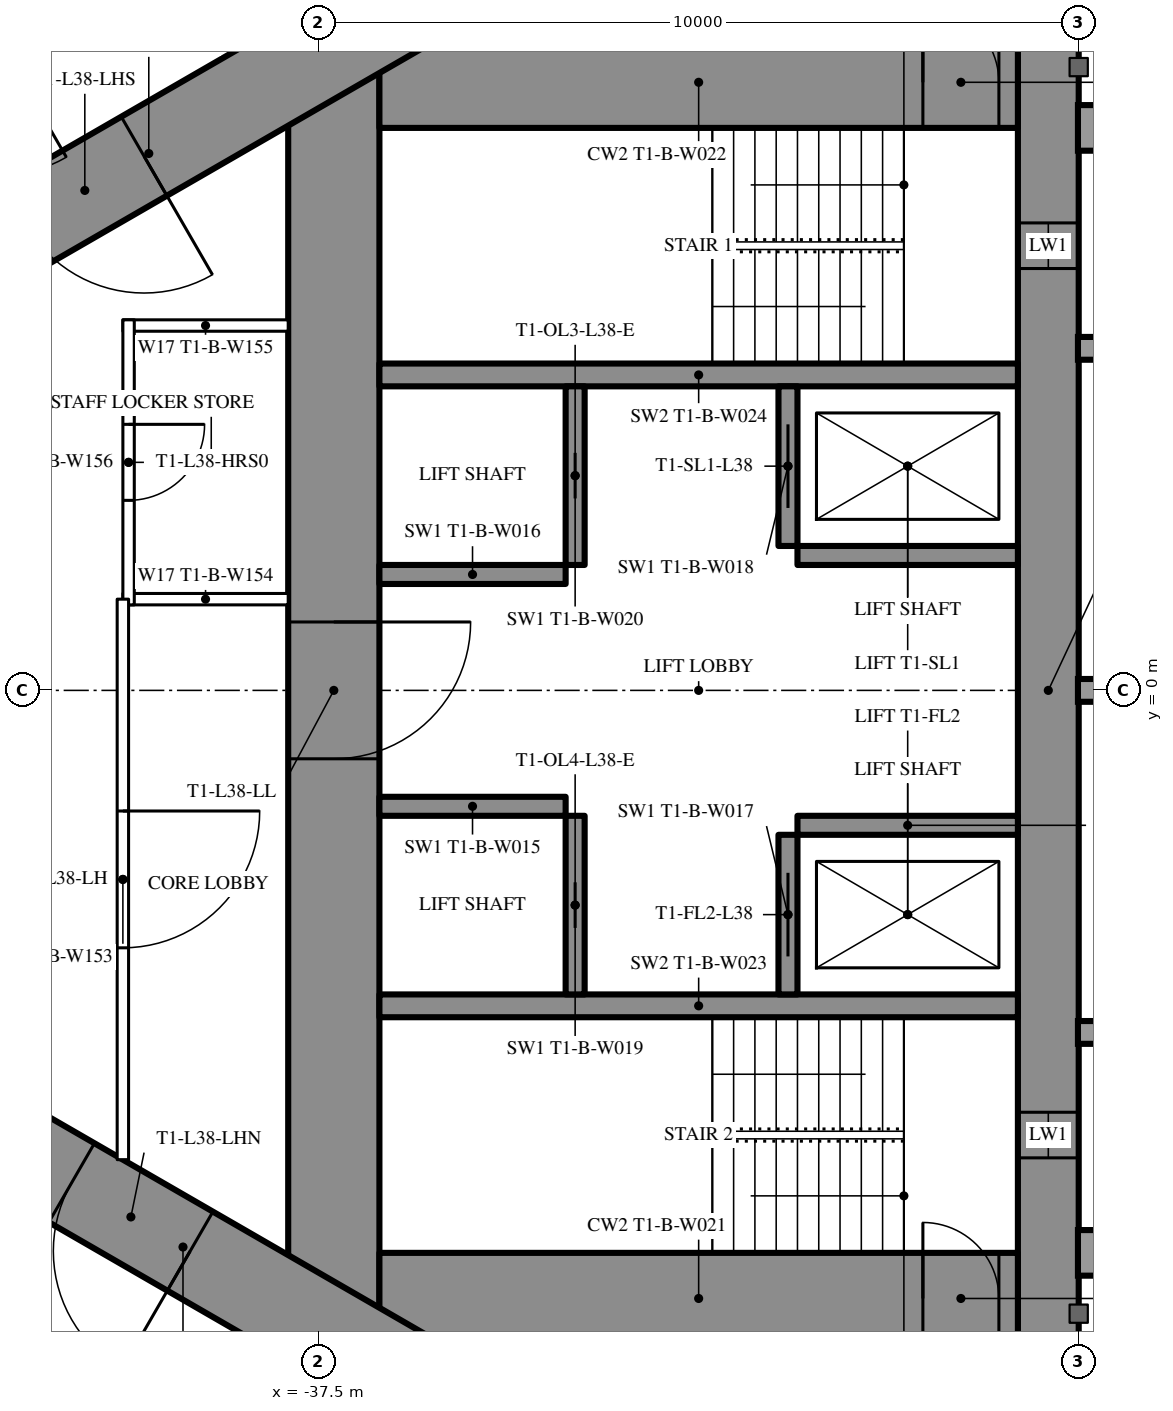
"""IFC4 building model, lengths in metres.
Left out: names, types, materials, properties, quantities, classifications, styles, units other than length and angle.
Written with IfcOpenShell. Run it as: python <this file> out.ifc"""

import sys

from ifc_helpers import new_model, si_unit, direction, frame, frame_2d, origin, place, context, subcontext, project, spatial, rectangle, extrude, element, fill, save


model = new_model("IFC4")
c1 = context("Model", 3, precision=1e-05, world=origin(), true_north=direction((0.0, 1.0)))
c2 = subcontext(c1, "Body", "Model", "MODEL_VIEW")
j1 = project(units=[si_unit("LENGTHUNIT", "METRE"), si_unit("PLANEANGLEUNIT", "RADIAN")], contexts=[c1])
p1 = place(None, origin())
s1 = spatial("IfcSite", under=j1, at=p1, CompositionType="ELEMENT")
p2 = place(p1, origin())
s2 = spatial("IfcBuilding", under=s1, at=p2, CompositionType="ELEMENT")
p3 = place(p2, frame((0.0, 0.0, 143.1)))
s3 = spatial("IfcBuildingStorey", under=s2, at=p3, CompositionType="ELEMENT", Elevation=143.1)
p4 = place(p3, frame((-27.9, 8.6, 0.0), z_axis=(0.0, 0.0, 1.0), x_axis=(0.0, -1.0, 0.0)))
e1 = element("IfcWall", 1, at=p4, inside=s3, PredefinedType="SHEAR", context=c2, shape_type="SweptSolid", body=[
    extrude(rectangle(XDim=17.2, YDim=0.8, at=frame_2d((8.6, 0.0))), origin(), (0.0, 0.0, 1.0), 3.6),
])
p5 = place(p4, frame((2.45, 0.0, 0.6)))
e2 = element("IfcOpeningElement", 2, at=p5, cuts=e1, PredefinedType="OPENING", context=c2, shape_type="SweptSolid", body=[
    extrude(rectangle(XDim=0.6, YDim=2.1, at=frame_2d((0.3, 1.05))), frame((0.0, 0.41, 0.0), z_axis=(0.0, -1.0, 0.0), x_axis=(1.0, 0.0, 0.0)), (0.0, 0.0, 1.0), 0.82),
])
p6 = place(p4, frame((14.15, 0.0, 0.6)))
e3 = element("IfcOpeningElement", 3, at=p6, cuts=e1, PredefinedType="OPENING", context=c2, shape_type="SweptSolid", body=[
    extrude(rectangle(XDim=0.6, YDim=2.1, at=frame_2d((0.3, 1.05))), frame((0.0, 0.41, 0.0), z_axis=(0.0, -1.0, 0.0), x_axis=(1.0, 0.0, 0.0)), (0.0, 0.0, 1.0), 0.82),
])
p7 = place(p3, frame((-37.3, 8.6, 0.0), z_axis=(0.0, 0.0, 1.0), x_axis=(0.0, -1.0, 0.0)))
e4 = element("IfcWall", 4, at=p7, inside=s3, PredefinedType="SHEAR", context=c2, shape_type="SweptSolid", body=[
    extrude(rectangle(XDim=17.2, YDim=1.2, at=frame_2d((8.6, 0.0))), origin(), (0.0, 0.0, 1.0), 3.6),
])
p8 = place(p7, frame((7.7, 0.0, 0.0)))
e5 = element("IfcOpeningElement", 5, at=p8, cuts=e4, PredefinedType="OPENING", context=c2, shape_type="SweptSolid", body=[
    extrude(rectangle(XDim=1.8, YDim=2.2, at=frame_2d((0.9, 1.1))), frame((0.0, 0.61, 0.0), z_axis=(0.0, -1.0, 0.0), x_axis=(1.0, 0.0, 0.0)), (0.0, 0.0, 1.0), 1.22),
])
p9 = place(p3, frame((-28.3, 8.0, 0.0), z_axis=(0.0, 0.0, 1.0), x_axis=(-1.0, 0.0, 0.0)))
e6 = element("IfcWall", 6, at=p9, inside=s3, PredefinedType="SHEAR", context=c2, shape_type="SweptSolid", body=[
    extrude(rectangle(XDim=8.4, YDim=1.2, at=frame_2d((4.2, 0.0))), origin(), (0.0, 0.0, 1.0), 3.6),
])
p10 = place(p9, frame((0.25, 0.0, 0.0)))
e7 = element("IfcOpeningElement", 7, at=p10, cuts=e6, PredefinedType="OPENING", context=c2, shape_type="SweptSolid", body=[
    extrude(rectangle(XDim=1.0, YDim=2.2, at=frame_2d((0.5, 1.1))), frame((0.0, 0.61, 0.0), z_axis=(0.0, -1.0, 0.0), x_axis=(1.0, 0.0, 0.0)), (0.0, 0.0, 1.0), 1.22),
])
p11 = place(p3, frame((-28.3, -8.0, 0.0), z_axis=(0.0, 0.0, 1.0), x_axis=(-1.0, 0.0, 0.0)))
e8 = element("IfcWall", 8, at=p11, inside=s3, PredefinedType="SHEAR", context=c2, shape_type="SweptSolid", body=[
    extrude(rectangle(XDim=8.4, YDim=1.2, at=frame_2d((4.2, 0.0))), origin(), (0.0, 0.0, 1.0), 3.6),
])
p12 = place(p11, frame((0.25, 0.0, 0.0)))
e9 = element("IfcOpeningElement", 9, at=p12, cuts=e8, PredefinedType="OPENING", context=c2, shape_type="SweptSolid", body=[
    extrude(rectangle(XDim=1.0, YDim=2.2, at=frame_2d((0.5, 1.1))), frame((0.0, 0.61, 0.0), z_axis=(0.0, -1.0, 0.0), x_axis=(1.0, 0.0, 0.0)), (0.0, 0.0, 1.0), 1.22),
])
for number, where, z_axis, x_axis in (
    (10, (-28.3, 4.15, 0.0), (0.0, 0.0, 1.0), (-1.0, 0.0, 0.0)),
    (11, (-28.3, -4.15, 0.0), (0.0, 0.0, 1.0), (-1.0, 0.0, 0.0)),
):
    element("IfcWall", number, at=place(p3, frame(where, z_axis=z_axis, x_axis=x_axis)), inside=s3, PredefinedType="SHEAR", context=c2, shape_type="SweptSolid", body=[
        extrude(rectangle(XDim=8.4, YDim=0.3, at=frame_2d((4.2, 0.0))), origin(), (0.0, 0.0, 1.0), 3.6),
    ])
p13 = place(p3, frame((-31.325, 4.0, 0.0), z_axis=(0.0, 0.0, 1.0), x_axis=(0.0, -1.0, 0.0)))
e12 = element("IfcWall", 12, at=p13, inside=s3, PredefinedType="SHEAR", context=c2, shape_type="SweptSolid", body=[
    extrude(rectangle(XDim=2.1, YDim=0.25, at=frame_2d((1.05, 0.0))), origin(), (0.0, 0.0, 1.0), 3.6),
])
p14 = place(p13, frame((0.5, 0.0, 0.0)))
e13 = element("IfcOpeningElement", 13, at=p14, cuts=e12, PredefinedType="OPENING", context=c2, shape_type="SweptSolid", body=[
    extrude(rectangle(XDim=1.1, YDim=2.2, at=frame_2d((0.55, 1.1))), frame((0.0, 0.135, 0.0), z_axis=(0.0, -1.0, 0.0), x_axis=(1.0, 0.0, 0.0)), (0.0, 0.0, 1.0), 0.27),
])
p15 = place(p3, frame((-34.125, 4.0, 0.0), z_axis=(0.0, 0.0, 1.0), x_axis=(0.0, -1.0, 0.0)))
e14 = element("IfcWall", 14, at=p15, inside=s3, PredefinedType="SHEAR", context=c2, shape_type="SweptSolid", body=[
    extrude(rectangle(XDim=2.35, YDim=0.25, at=frame_2d((1.175, 0.0))), origin(), (0.0, 0.0, 1.0), 3.6),
])
p16 = place(p15, frame((0.875, 0.0, 0.0)))
e15 = element("IfcOpeningElement", 15, at=p16, cuts=e14, PredefinedType="OPENING", context=c2, shape_type="SweptSolid", body=[
    extrude(rectangle(XDim=0.6, YDim=2.0, at=frame_2d((0.3, 1.0))), frame((0.0, 0.135, 0.0), z_axis=(0.0, -1.0, 0.0), x_axis=(1.0, 0.0, 0.0)), (0.0, 0.0, 1.0), 0.27),
])
p17 = place(p3, frame((-28.3, 1.775, 0.0), z_axis=(0.0, 0.0, 1.0), x_axis=(-1.0, 0.0, 0.0)))
e16 = element("IfcWall", 16, at=p17, inside=s3, PredefinedType="SHEAR", context=c2, shape_type="SweptSolid", body=[
    extrude(rectangle(XDim=2.9, YDim=0.25, at=frame_2d((1.45, 0.0))), origin(), (0.0, 0.0, 1.0), 3.6),
])
p18 = place(p3, frame((-34.25, 1.525, 0.0), z_axis=(0.0, 0.0, 1.0), x_axis=(-1.0, 0.0, 0.0)))
e17 = element("IfcWall", 17, at=p18, inside=s3, PredefinedType="SHEAR", context=c2, shape_type="SweptSolid", body=[
    extrude(rectangle(XDim=2.45, YDim=0.25, at=frame_2d((1.225, 0.0))), origin(), (0.0, 0.0, 1.0), 3.6),
])
p19 = place(p3, frame((-31.325, -1.9, 0.0), z_axis=(0.0, 0.0, 1.0), x_axis=(0.0, -1.0, 0.0)))
e18 = element("IfcWall", 18, at=p19, inside=s3, PredefinedType="SHEAR", context=c2, shape_type="SweptSolid", body=[
    extrude(rectangle(XDim=2.1, YDim=0.25, at=frame_2d((1.05, 0.0))), origin(), (0.0, 0.0, 1.0), 3.6),
])
p20 = place(p19, frame((0.5, 0.0, 0.0)))
e19 = element("IfcOpeningElement", 19, at=p20, cuts=e18, PredefinedType="OPENING", context=c2, shape_type="SweptSolid", body=[
    extrude(rectangle(XDim=1.1, YDim=2.2, at=frame_2d((0.55, 1.1))), frame((0.0, 0.135, 0.0), z_axis=(0.0, -1.0, 0.0), x_axis=(1.0, 0.0, 0.0)), (0.0, 0.0, 1.0), 0.27),
])
p21 = place(p3, frame((-34.125, -1.65, 0.0), z_axis=(0.0, 0.0, 1.0), x_axis=(0.0, -1.0, 0.0)))
e20 = element("IfcWall", 20, at=p21, inside=s3, PredefinedType="SHEAR", context=c2, shape_type="SweptSolid", body=[
    extrude(rectangle(XDim=2.35, YDim=0.25, at=frame_2d((1.175, 0.0))), origin(), (0.0, 0.0, 1.0), 3.6),
])
p22 = place(p21, frame((0.875, 0.0, 0.0)))
e21 = element("IfcOpeningElement", 21, at=p22, cuts=e20, PredefinedType="OPENING", context=c2, shape_type="SweptSolid", body=[
    extrude(rectangle(XDim=0.6, YDim=2.0, at=frame_2d((0.3, 1.0))), frame((0.0, 0.135, 0.0), z_axis=(0.0, -1.0, 0.0), x_axis=(1.0, 0.0, 0.0)), (0.0, 0.0, 1.0), 0.27),
])
p23 = place(p3, frame((-28.3, -1.775, 0.0), z_axis=(0.0, 0.0, 1.0), x_axis=(-1.0, 0.0, 0.0)))
e22 = element("IfcWall", 22, at=p23, inside=s3, PredefinedType="SHEAR", context=c2, shape_type="SweptSolid", body=[
    extrude(rectangle(XDim=2.9, YDim=0.25, at=frame_2d((1.45, 0.0))), origin(), (0.0, 0.0, 1.0), 3.6),
])
p24 = place(p3, frame((-34.25, -1.525, 0.0), z_axis=(0.0, 0.0, 1.0), x_axis=(-1.0, 0.0, 0.0)))
e23 = element("IfcWall", 23, at=p24, inside=s3, PredefinedType="SHEAR", context=c2, shape_type="SweptSolid", body=[
    extrude(rectangle(XDim=2.45, YDim=0.25, at=frame_2d((1.225, 0.0))), origin(), (0.0, 0.0, 1.0), 3.6),
])
p25 = place(p3, frame((-27.2, 14.3, 0.0), z_axis=(0.0, 0.0, 1.0), x_axis=(-0.866026593062, -0.499997940104, 0.0)))
e24 = element("IfcWall", 24, at=p25, inside=s3, PredefinedType="SHEAR", context=c2, shape_type="SweptSolid", body=[
    extrude(rectangle(XDim=28.946, YDim=1.2, at=frame_2d((14.473, 0.0))), origin(), (0.0, 0.0, 1.0), 3.6),
])
p26 = place(p25, frame((4.6, 0.0, 0.0)))
e25 = element("IfcOpeningElement", 25, at=p26, cuts=e24, PredefinedType="OPENING", context=c2, shape_type="SweptSolid", body=[
    extrude(rectangle(XDim=1.0, YDim=2.2, at=frame_2d((0.5, 1.1))), frame((0.0, 0.61, 0.0), z_axis=(0.0, -1.0, 0.0), x_axis=(1.0, 0.0, 0.0)), (0.0, 0.0, 1.0), 1.22),
])
p27 = place(p25, frame((14.545, 0.0, 0.0)))
e26 = element("IfcOpeningElement", 26, at=p27, cuts=e24, PredefinedType="OPENING", context=c2, shape_type="SweptSolid", body=[
    extrude(rectangle(XDim=1.8, YDim=2.2, at=frame_2d((0.9, 1.1))), frame((0.0, 0.61, 0.0), z_axis=(0.0, -1.0, 0.0), x_axis=(1.0, 0.0, 0.0)), (0.0, 0.0, 1.0), 1.22),
])
p28 = place(p3, frame((-27.2, -14.3, 0.0), z_axis=(0.0, 0.0, 1.0), x_axis=(-0.866024021859, 0.500002393557, 0.0)))
e27 = element("IfcWall", 27, at=p28, inside=s3, PredefinedType="SHEAR", context=c2, shape_type="SweptSolid", body=[
    extrude(rectangle(XDim=27.907, YDim=1.2, at=frame_2d((13.954, 0.0))), origin(), (0.0, 0.0, 1.0), 3.6),
])
p29 = place(p28, frame((4.6, 0.0, 0.0)))
e28 = element("IfcOpeningElement", 28, at=p29, cuts=e27, PredefinedType="OPENING", context=c2, shape_type="SweptSolid", body=[
    extrude(rectangle(XDim=1.0, YDim=2.2, at=frame_2d((0.5, 1.1))), frame((0.0, 0.61, 0.0), z_axis=(0.0, -1.0, 0.0), x_axis=(1.0, 0.0, 0.0)), (0.0, 0.0, 1.0), 1.22),
])
p30 = place(p28, frame((13.845, 0.0, 0.0)))
e29 = element("IfcOpeningElement", 29, at=p30, cuts=e27, PredefinedType="OPENING", context=c2, shape_type="SweptSolid", body=[
    extrude(rectangle(XDim=1.8, YDim=2.2, at=frame_2d((0.9, 1.1))), frame((0.0, 0.61, 0.0), z_axis=(0.0, -1.0, 0.0), x_axis=(1.0, 0.0, 0.0)), (0.0, 0.0, 1.0), 1.22),
])
p31 = place(p3, frame((-37.7, 10.894, 0.0), z_axis=(0.0, 0.0, 1.0), x_axis=(-0.866027905338, -0.499995667157, 0.0)))
e30 = element("IfcWall", 30, at=p31, inside=s3, PredefinedType="PARTITIONING", context=c2, shape_type="SweptSolid", body=[
    extrude(rectangle(XDim=21.787, YDim=0.2, at=frame_2d((10.894, 0.0))), origin(), (0.0, 0.0, 1.0), 3.35),
])
p32 = place(p31, frame((14.296, 0.0, 0.0)))
e31 = element("IfcOpeningElement", 31, at=p32, cuts=e30, PredefinedType="OPENING", context=c2, shape_type="SweptSolid", body=[
    extrude(rectangle(XDim=1.8, YDim=2.2, at=frame_2d((0.9, 1.1))), frame((0.0, 0.11, 0.0), z_axis=(0.0, -1.0, 0.0), x_axis=(1.0, 0.0, 0.0)), (0.0, 0.0, 1.0), 0.22),
])
p33 = place(p31, frame((19.399, 0.0, 0.0)))
e32 = element("IfcOpeningElement", 32, at=p33, cuts=e30, PredefinedType="OPENING", context=c2, shape_type="SweptSolid", body=[
    extrude(rectangle(XDim=1.8, YDim=2.14, at=frame_2d((0.9, 1.07))), frame((0.0, 0.11, 0.0), z_axis=(0.0, -1.0, 0.0), x_axis=(1.0, 0.0, 0.0)), (0.0, 0.0, 1.0), 0.22),
])
p34 = place(p31, frame((4.64, 0.0, 0.0)))
e33 = element("IfcOpeningElement", 33, at=p34, cuts=e30, PredefinedType="OPENING", context=c2, shape_type="SweptSolid", body=[
    extrude(rectangle(XDim=1.8, YDim=2.2, at=frame_2d((0.9, 1.1))), frame((0.0, 0.11, 0.0), z_axis=(0.0, -1.0, 0.0), x_axis=(1.0, 0.0, 0.0)), (0.0, 0.0, 1.0), 0.22),
])
p35 = place(p3, frame((-36.92, -11.344, 0.0), z_axis=(0.0, 0.0, 1.0), x_axis=(-0.866028313256, 0.499994960614, 0.0)))
e34 = element("IfcWall", 34, at=p35, inside=s3, PredefinedType="PARTITIONING", context=c2, shape_type="SweptSolid", body=[
    extrude(rectangle(XDim=22.568, YDim=0.2, at=frame_2d((11.284, 0.0))), origin(), (0.0, 0.0, 1.0), 3.35),
])
p36 = place(p35, frame((20.24, 0.0, 0.0)))
e35 = element("IfcOpeningElement", 35, at=p36, cuts=e34, PredefinedType="OPENING", context=c2, shape_type="SweptSolid", body=[
    extrude(rectangle(XDim=1.8, YDim=2.14, at=frame_2d((0.9, 1.07))), frame((0.0, 0.11, 0.0), z_axis=(0.0, -1.0, 0.0), x_axis=(1.0, 0.0, 0.0)), (0.0, 0.0, 1.0), 0.22),
])
p37 = place(p35, frame((14.946, 0.0, 0.0)))
e36 = element("IfcOpeningElement", 36, at=p37, cuts=e34, PredefinedType="OPENING", context=c2, shape_type="SweptSolid", body=[
    extrude(rectangle(XDim=1.8, YDim=2.2, at=frame_2d((0.9, 1.1))), frame((0.0, 0.11, 0.0), z_axis=(0.0, -1.0, 0.0), x_axis=(1.0, 0.0, 0.0)), (0.0, 0.0, 1.0), 0.22),
])
p38 = place(p35, frame((5.091, 0.0, 0.0)))
e37 = element("IfcOpeningElement", 37, at=p38, cuts=e34, PredefinedType="OPENING", context=c2, shape_type="SweptSolid", body=[
    extrude(rectangle(XDim=1.8, YDim=2.2, at=frame_2d((0.9, 1.1))), frame((0.0, 0.11, 0.0), z_axis=(0.0, -1.0, 0.0), x_axis=(1.0, 0.0, 0.0)), (0.0, 0.0, 1.0), 0.22),
])
for number, where, z_axis, x_axis in (
    (38, (-37.9, 1.2, 0.0), (0.0, 0.0, 1.0), (-1.0, 0.0, 0.0)),
    (39, (-37.9, 4.8, 0.0), (0.0, 0.0, 1.0), (-1.0, 0.0, 0.0)),
):
    element("IfcWall", number, at=place(p3, frame(where, z_axis=z_axis, x_axis=x_axis)), inside=s3, PredefinedType="PARTITIONING", context=c2, shape_type="SweptSolid", body=[
        extrude(rectangle(XDim=2.175, YDim=0.15, at=frame_2d((1.087, 0.0))), origin(), (0.0, 0.0, 1.0), 3.35),
    ])
p39 = place(p3, frame((-40.0, 4.875, 0.0), z_axis=(0.0, 0.0, 1.0), x_axis=(0.0, -1.0, 0.0)))
e40 = element("IfcWall", 40, at=p39, inside=s3, PredefinedType="PARTITIONING", context=c2, shape_type="SweptSolid", body=[
    extrude(rectangle(XDim=3.75, YDim=0.15, at=frame_2d((1.875, 0.0))), origin(), (0.0, 0.0, 1.0), 3.35),
])
p40 = place(p39, frame((1.375, 0.0, 0.0)))
e41 = element("IfcOpeningElement", 41, at=p40, cuts=e40, PredefinedType="OPENING", context=c2, shape_type="SweptSolid", body=[
    extrude(rectangle(XDim=1.0, YDim=2.2, at=frame_2d((0.5, 1.1))), frame((0.0, 0.085, 0.0), z_axis=(0.0, -1.0, 0.0), x_axis=(1.0, 0.0, 0.0)), (0.0, 0.0, 1.0), 0.17),
])
p41 = place(p3, frame((-40.075, 1.2, 0.0), z_axis=(0.0, 0.0, 1.0), x_axis=(0.0, -1.0, 0.0)))
e42 = element("IfcWall", 42, at=p41, inside=s3, PredefinedType="PARTITIONING", context=c2, shape_type="SweptSolid", body=[
    extrude(rectangle(XDim=7.374, YDim=0.15, at=frame_2d((3.687, 0.0))), origin(), (0.0, 0.0, 1.0), 3.35),
])
p42 = place(p41, frame((2.787, 0.0, 0.0)))
e43 = element("IfcOpeningElement", 43, at=p42, cuts=e42, PredefinedType="OPENING", context=c2, shape_type="SweptSolid", body=[
    extrude(rectangle(XDim=1.8, YDim=2.2, at=frame_2d((0.9, 1.1))), frame((0.0, 0.085, 0.0), z_axis=(0.0, -1.0, 0.0), x_axis=(1.0, 0.0, 0.0)), (0.0, 0.0, 1.0), 0.17),
])
p43 = place(p40, origin())
e44 = element("IfcDoor", 44, at=p43, inside=s3, OperationType="SINGLE_SWING_LEFT", PredefinedType="DOOR", context=c2, shape_type="SweptSolid", body=[
    extrude(rectangle(XDim=1.0, YDim=2.2, at=frame_2d((0.5, 1.1))), frame((0.0, 0.025, 0.0), z_axis=(0.0, -1.0, 0.0), x_axis=(1.0, 0.0, 0.0)), (0.0, 0.0, 1.0), 0.05),
])
fill(e41, e44)
p44 = place(p42, origin())
e45 = element("IfcDoor", 45, at=p44, inside=s3, OperationType="DOUBLE_DOOR_SINGLE_SWING", PredefinedType="DOOR", context=c2, shape_type="SweptSolid", body=[
    extrude(rectangle(XDim=1.8, YDim=2.2, at=frame_2d((0.9, 1.1))), frame((0.0, 0.025, 0.0), z_axis=(0.0, -1.0, 0.0), x_axis=(1.0, 0.0, 0.0)), (0.0, 0.0, 1.0), 0.05),
])
fill(e43, e45)
p45 = place(p27, origin())
e46 = element("IfcDoor", 46, at=p45, inside=s3, OperationType="DOUBLE_DOOR_SINGLE_SWING", PredefinedType="DOOR", context=c2, shape_type="SweptSolid", body=[
    extrude(rectangle(XDim=1.8, YDim=2.2, at=frame_2d((0.9, 1.1))), frame((0.0, 0.025, 0.0), z_axis=(0.0, -1.0, 0.0), x_axis=(1.0, 0.0, 0.0)), (0.0, 0.0, 1.0), 0.05),
])
fill(e26, e46)
p46 = place(p30, origin())
e47 = element("IfcDoor", 47, at=p46, inside=s3, OperationType="DOUBLE_DOOR_SINGLE_SWING", PredefinedType="DOOR", context=c2, shape_type="SweptSolid", body=[
    extrude(rectangle(XDim=1.8, YDim=2.2, at=frame_2d((0.9, 1.1))), frame((0.0, 0.025, 0.0), z_axis=(0.0, -1.0, 0.0), x_axis=(1.0, 0.0, 0.0)), (0.0, 0.0, 1.0), 0.05),
])
fill(e29, e47)
p47 = place(p8, origin())
e48 = element("IfcDoor", 48, at=p47, inside=s3, OperationType="DOUBLE_DOOR_SINGLE_SWING", PredefinedType="DOOR", context=c2, shape_type="SweptSolid", body=[
    extrude(rectangle(XDim=1.8, YDim=2.2, at=frame_2d((0.9, 1.1))), frame((0.0, 0.025, 0.0), z_axis=(0.0, -1.0, 0.0), x_axis=(1.0, 0.0, 0.0)), (0.0, 0.0, 1.0), 0.05),
])
fill(e5, e48)
p48 = place(p10, origin())
e49 = element("IfcDoor", 49, at=p48, inside=s3, OperationType="SINGLE_SWING_RIGHT", PredefinedType="DOOR", context=c2, shape_type="SweptSolid", body=[
    extrude(rectangle(XDim=1.0, YDim=2.2, at=frame_2d((0.5, 1.1))), frame((0.0, 0.025, 0.0), z_axis=(0.0, -1.0, 0.0), x_axis=(1.0, 0.0, 0.0)), (0.0, 0.0, 1.0), 0.05),
])
fill(e7, e49)
p49 = place(p12, origin())
e50 = element("IfcDoor", 50, at=p49, inside=s3, OperationType="SINGLE_SWING_RIGHT", PredefinedType="DOOR", context=c2, shape_type="SweptSolid", body=[
    extrude(rectangle(XDim=1.0, YDim=2.2, at=frame_2d((0.5, 1.1))), frame((0.0, 0.025, 0.0), z_axis=(0.0, -1.0, 0.0), x_axis=(1.0, 0.0, 0.0)), (0.0, 0.0, 1.0), 0.05),
])
fill(e9, e50)
p50 = place(p14, origin())
e51 = element("IfcDoor", 51, at=p50, inside=s3, OperationType="SLIDING_TO_LEFT", PredefinedType="USERDEFINED", context=c2, shape_type="SweptSolid", body=[
    extrude(rectangle(XDim=1.1, YDim=2.2, at=frame_2d((0.55, 1.1))), frame((0.0, 0.025, 0.0), z_axis=(0.0, -1.0, 0.0), x_axis=(1.0, 0.0, 0.0)), (0.0, 0.0, 1.0), 0.05),
])
fill(e13, e51)
p51 = place(p20, origin())
e52 = element("IfcDoor", 52, at=p51, inside=s3, OperationType="SLIDING_TO_LEFT", PredefinedType="USERDEFINED", context=c2, shape_type="SweptSolid", body=[
    extrude(rectangle(XDim=1.1, YDim=2.2, at=frame_2d((0.55, 1.1))), frame((0.0, 0.025, 0.0), z_axis=(0.0, -1.0, 0.0), x_axis=(1.0, 0.0, 0.0)), (0.0, 0.0, 1.0), 0.05),
])
fill(e19, e52)
p52 = place(p16, origin())
e53 = element("IfcDoor", 53, at=p52, inside=s3, OperationType="SLIDING_TO_LEFT", PredefinedType="DOOR", context=c2, shape_type="SweptSolid", body=[
    extrude(rectangle(XDim=0.6, YDim=2.0, at=frame_2d((0.3, 1.0))), frame((0.0, 0.025, 0.0), z_axis=(0.0, -1.0, 0.0), x_axis=(1.0, 0.0, 0.0)), (0.0, 0.0, 1.0), 0.05),
])
fill(e15, e53)
p53 = place(p22, origin())
e54 = element("IfcDoor", 54, at=p53, inside=s3, OperationType="SLIDING_TO_LEFT", PredefinedType="DOOR", context=c2, shape_type="SweptSolid", body=[
    extrude(rectangle(XDim=0.6, YDim=2.0, at=frame_2d((0.3, 1.0))), frame((0.0, 0.025, 0.0), z_axis=(0.0, -1.0, 0.0), x_axis=(1.0, 0.0, 0.0)), (0.0, 0.0, 1.0), 0.05),
])
fill(e21, e54)
p54 = place(p5, origin())
e55 = element("IfcWindow", 55, at=p54, inside=s3, PartitioningType="SINGLE_PANEL", PredefinedType="WINDOW", context=c2, shape_type="SweptSolid", body=[
    extrude(rectangle(XDim=0.6, YDim=2.1, at=frame_2d((0.3, 1.05))), frame((0.0, 0.03, 0.0), z_axis=(0.0, -1.0, 0.0), x_axis=(1.0, 0.0, 0.0)), (0.0, 0.0, 1.0), 0.06),
])
fill(e2, e55)
p55 = place(p6, origin())
e56 = element("IfcWindow", 56, at=p55, inside=s3, PartitioningType="SINGLE_PANEL", PredefinedType="WINDOW", context=c2, shape_type="SweptSolid", body=[
    extrude(rectangle(XDim=0.6, YDim=2.1, at=frame_2d((0.3, 1.05))), frame((0.0, 0.03, 0.0), z_axis=(0.0, -1.0, 0.0), x_axis=(1.0, 0.0, 0.0)), (0.0, 0.0, 1.0), 0.06),
])
fill(e3, e56)
save(model, sys.argv[1])
